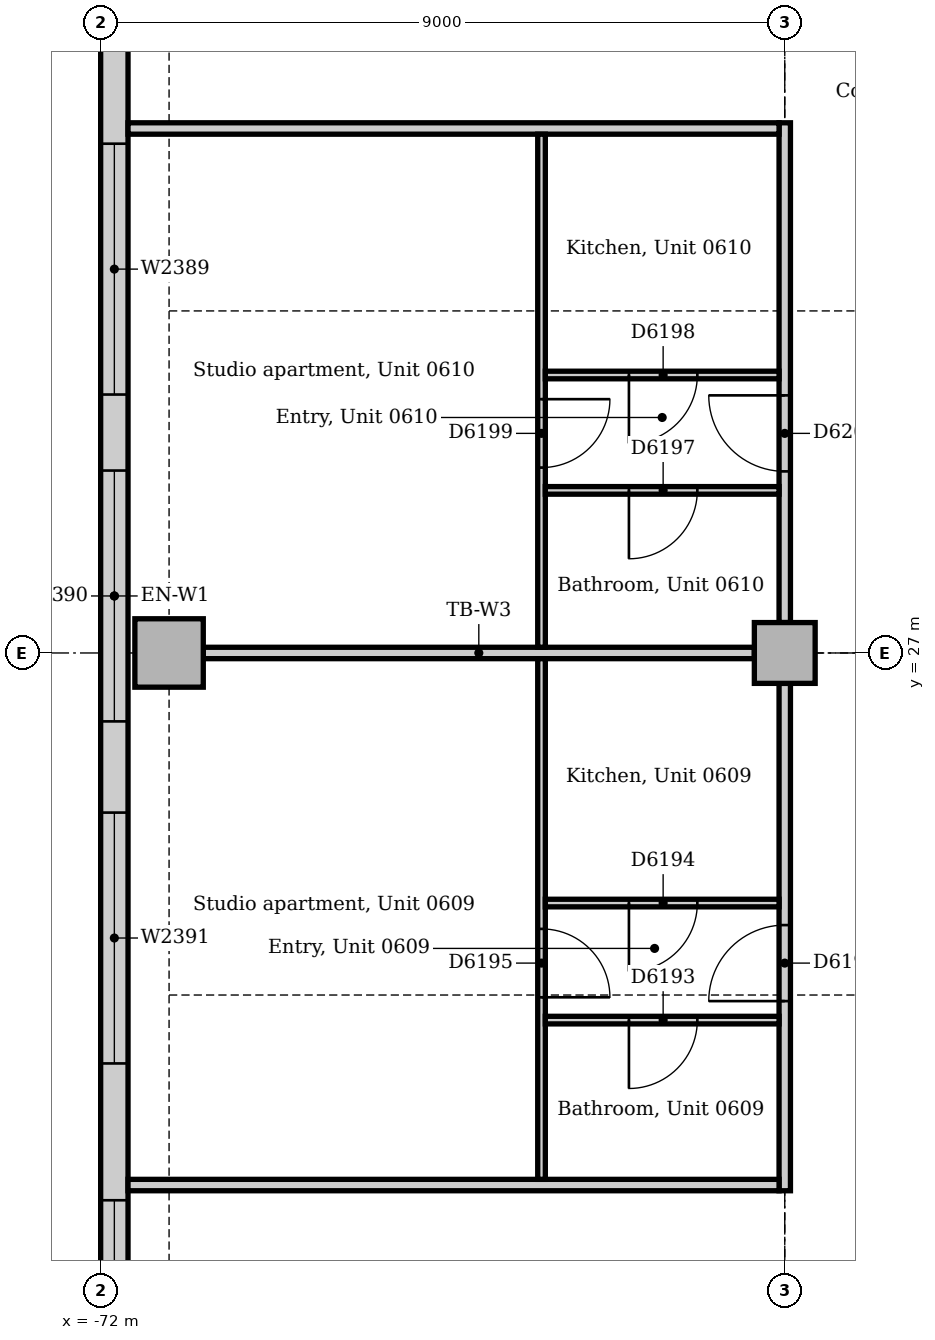
"""IFC4 building model, lengths in metres.
Left out: names, types, materials, properties, quantities, classifications, styles, units other than length and angle.
Written with IfcOpenShell. Run it as: python <this file> out.ifc"""

import sys

from ifc_helpers import new_model, si_unit, direction, frame, frame_2d, origin, origin_2d, place, context, subcontext, project, spatial, rectangle, extrude, element, fill, save


model = new_model("IFC4")
c1 = context("Model", 3, precision=1e-05, world=origin(), true_north=direction((0.0, 1.0)))
c2 = subcontext(c1, "Body", "Model", "MODEL_VIEW")
j1 = project(units=[si_unit("LENGTHUNIT", "METRE"), si_unit("PLANEANGLEUNIT", "RADIAN")], contexts=[c1])
p1 = place(None, origin())
s1 = spatial("IfcSite", under=j1, at=p1, CompositionType="ELEMENT")
p2 = place(p1, origin())
s2 = spatial("IfcBuilding", under=s1, at=p2, CompositionType="ELEMENT")
p3 = place(p2, frame((0.0, 0.0, 30.0)))
s3 = spatial("IfcBuildingStorey", under=s2, at=p3, CompositionType="ELEMENT", Elevation=30.0)
p4 = place(p3, frame((-71.1, 27.0, 0.0), z_axis=(0.0, 0.0, 1.0), x_axis=(1.0, 0.0, 0.0)))
e1 = element("IfcColumn", 1, at=p4, inside=s3, PredefinedType="COLUMN", context=c2, shape_type="SweptSolid", body=[
    extrude(rectangle(XDim=0.9, YDim=0.9, at=origin_2d()), origin(), (0.0, 0.0, 1.0), 3.85),
])
p5 = place(p3, frame((-63.0, 27.0, 0.0), z_axis=(0.0, 0.0, 1.0), x_axis=(1.0, 0.0, 0.0)))
e2 = element("IfcColumn", 2, at=p5, inside=s3, PredefinedType="COLUMN", context=c2, shape_type="SweptSolid", body=[
    extrude(rectangle(XDim=0.8, YDim=0.8, at=origin_2d()), origin(), (0.0, 0.0, 1.0), 3.85),
])
p6 = place(p3, frame((-71.82, 40.757, 0.0), z_axis=(0.0, 0.0, 1.0), x_axis=(0.0, -1.0, 0.0)))
e3 = element("IfcWall", 3, at=p6, inside=s3, PredefinedType="STANDARD", context=c2, shape_type="SweptSolid", body=[
    extrude(rectangle(XDim=26.015, YDim=0.36, at=frame_2d((13.007, 0.0))), origin(), (0.0, 0.0, 1.0), 3.85),
])
p7 = place(p6, frame((2.357, 0.0, 0.9)))
e4 = element("IfcOpeningElement", 4, at=p7, cuts=e3, PredefinedType="OPENING", context=c2, shape_type="SweptSolid", body=[
    extrude(rectangle(XDim=3.3, YDim=1.6, at=frame_2d((1.65, 0.8))), frame((0.0, 0.19, 0.0), z_axis=(0.0, -1.0, 0.0), x_axis=(1.0, 0.0, 0.0)), (0.0, 0.0, 1.0), 0.38),
])
p8 = place(p6, frame((7.057, 0.0, 0.9)))
e5 = element("IfcOpeningElement", 5, at=p8, cuts=e3, PredefinedType="OPENING", context=c2, shape_type="SweptSolid", body=[
    extrude(rectangle(XDim=3.3, YDim=1.6, at=frame_2d((1.65, 0.8))), frame((0.0, 0.19, 0.0), z_axis=(0.0, -1.0, 0.0), x_axis=(1.0, 0.0, 0.0)), (0.0, 0.0, 1.0), 0.38),
])
p9 = place(p6, frame((11.357, 0.0, 0.9)))
e6 = element("IfcOpeningElement", 6, at=p9, cuts=e3, PredefinedType="OPENING", context=c2, shape_type="SweptSolid", body=[
    extrude(rectangle(XDim=3.3, YDim=1.6, at=frame_2d((1.65, 0.8))), frame((0.0, 0.19, 0.0), z_axis=(0.0, -1.0, 0.0), x_axis=(1.0, 0.0, 0.0)), (0.0, 0.0, 1.0), 0.38),
])
p10 = place(p6, frame((15.857, 0.0, 0.9)))
e7 = element("IfcOpeningElement", 7, at=p10, cuts=e3, PredefinedType="OPENING", context=c2, shape_type="SweptSolid", body=[
    extrude(rectangle(XDim=3.3, YDim=1.6, at=frame_2d((1.65, 0.8))), frame((0.0, 0.19, 0.0), z_axis=(0.0, -1.0, 0.0), x_axis=(1.0, 0.0, 0.0)), (0.0, 0.0, 1.0), 0.38),
])
p11 = place(p6, frame((20.957, 0.0, 0.9)))
e8 = element("IfcOpeningElement", 8, at=p11, cuts=e3, PredefinedType="OPENING", context=c2, shape_type="SweptSolid", body=[
    extrude(rectangle(XDim=3.3, YDim=1.6, at=frame_2d((1.65, 0.8))), frame((0.0, 0.19, 0.0), z_axis=(0.0, -1.0, 0.0), x_axis=(1.0, 0.0, 0.0)), (0.0, 0.0, 1.0), 0.38),
])
p12 = place(p3, frame((-63.0, 19.925, 0.0), z_axis=(0.0, 0.0, 1.0), x_axis=(0.0, 1.0, 0.0)))
e9 = element("IfcWall", 9, at=p12, inside=s3, PredefinedType="PARTITIONING", context=c2, shape_type="SweptSolid", body=[
    extrude(rectangle(XDim=6.675, YDim=0.15, at=frame_2d((3.337, 0.0))), origin(), (0.0, 0.0, 1.0), 3.158),
])
p13 = place(p12, frame((2.495, 0.0, 0.0)))
e10 = element("IfcOpeningElement", 10, at=p13, cuts=e9, PredefinedType="OPENING", context=c2, shape_type="SweptSolid", body=[
    extrude(rectangle(XDim=1.0, YDim=2.1, at=frame_2d((0.5, 1.05))), frame((0.0, 0.085, 0.0), z_axis=(0.0, -1.0, 0.0), x_axis=(1.0, 0.0, 0.0)), (0.0, 0.0, 1.0), 0.17),
])
p14 = place(p3, frame((-63.0, 27.4, 0.0), z_axis=(0.0, 0.0, 1.0), x_axis=(0.0, 1.0, 0.0)))
e11 = element("IfcWall", 11, at=p14, inside=s3, PredefinedType="PARTITIONING", context=c2, shape_type="SweptSolid", body=[
    extrude(rectangle(XDim=6.575, YDim=0.15, at=frame_2d((3.288, 0.0))), origin(), (0.0, 0.0, 1.0), 3.158),
])
p15 = place(p14, frame((1.989, 0.0, 0.0)))
e12 = element("IfcOpeningElement", 12, at=p15, cuts=e11, PredefinedType="OPENING", context=c2, shape_type="SweptSolid", body=[
    extrude(rectangle(XDim=1.0, YDim=2.1, at=frame_2d((0.5, 1.05))), frame((0.0, 0.085, 0.0), z_axis=(0.0, -1.0, 0.0), x_axis=(1.0, 0.0, 0.0)), (0.0, 0.0, 1.0), 0.17),
])
for number, where, z_axis, x_axis in (
    (13, (-71.64, 20.0, 0.0), (0.0, 0.0, 1.0), (1.0, 0.0, 0.0)),
    (14, (-71.64, 33.9, 0.0), (0.0, 0.0, 1.0), (1.0, 0.0, 0.0)),
):
    element("IfcWall", number, at=place(p3, frame(where, z_axis=z_axis, x_axis=x_axis)), inside=s3, PredefinedType="PARTITIONING", context=c2, shape_type="SweptSolid", body=[
        extrude(rectangle(XDim=8.565, YDim=0.15, at=frame_2d((4.282, 0.0))), origin(), (0.0, 0.0, 1.0), 3.85),
    ])
p16 = place(p3, frame((-70.65, 27.0, 0.0), z_axis=(0.0, 0.0, 1.0), x_axis=(1.0, 0.0, 0.0)))
e15 = element("IfcWall", 15, at=p16, inside=s3, PredefinedType="PARTITIONING", context=c2, shape_type="SweptSolid", body=[
    extrude(rectangle(XDim=7.25, YDim=0.15, at=frame_2d((3.625, 0.0))), origin(), (0.0, 0.0, 1.0), 3.15),
])
p17 = place(p3, frame((-66.2, 27.075, 0.0), z_axis=(0.0, 0.0, 1.0), x_axis=(0.0, 1.0, 0.0)))
e16 = element("IfcWall", 16, at=p17, inside=s3, PredefinedType="PARTITIONING", context=c2, shape_type="SweptSolid", body=[
    extrude(rectangle(XDim=6.75, YDim=0.1, at=frame_2d((3.375, 0.0))), origin(), (0.0, 0.0, 1.0), 3.85),
])
p18 = place(p17, frame((2.364, 0.0, 0.0)))
e17 = element("IfcOpeningElement", 17, at=p18, cuts=e16, PredefinedType="OPENING", context=c2, shape_type="SweptSolid", body=[
    extrude(rectangle(XDim=0.9, YDim=2.1, at=frame_2d((0.45, 1.05))), frame((0.0, 0.06, 0.0), z_axis=(0.0, -1.0, 0.0), x_axis=(1.0, 0.0, 0.0)), (0.0, 0.0, 1.0), 0.12),
])
p19 = place(p3, frame((-66.2, 20.075, 0.0), z_axis=(0.0, 0.0, 1.0), x_axis=(0.0, 1.0, 0.0)))
e18 = element("IfcWall", 18, at=p19, inside=s3, PredefinedType="PARTITIONING", context=c2, shape_type="SweptSolid", body=[
    extrude(rectangle(XDim=6.85, YDim=0.1, at=frame_2d((3.425, 0.0))), origin(), (0.0, 0.0, 1.0), 3.85),
])
p20 = place(p19, frame((2.395, 0.0, 0.0)))
e19 = element("IfcOpeningElement", 19, at=p20, cuts=e18, PredefinedType="OPENING", context=c2, shape_type="SweptSolid", body=[
    extrude(rectangle(XDim=0.9, YDim=2.1, at=frame_2d((0.45, 1.05))), frame((0.0, 0.06, 0.0), z_axis=(0.0, -1.0, 0.0), x_axis=(1.0, 0.0, 0.0)), (0.0, 0.0, 1.0), 0.12),
])
p21 = place(p3, frame((-66.15, 22.17, 0.0), z_axis=(0.0, 0.0, 1.0), x_axis=(1.0, 0.0, 0.0)))
e20 = element("IfcWall", 20, at=p21, inside=s3, PredefinedType="PARTITIONING", context=c2, shape_type="SweptSolid", body=[
    extrude(rectangle(XDim=3.075, YDim=0.1, at=frame_2d((1.538, 0.0))), origin(), (0.0, 0.0, 1.0), 3.85),
])
p22 = place(p21, frame((1.1, 0.0, 0.0)))
e21 = element("IfcOpeningElement", 21, at=p22, cuts=e20, PredefinedType="OPENING", context=c2, shape_type="SweptSolid", body=[
    extrude(rectangle(XDim=0.9, YDim=2.1, at=frame_2d((0.45, 1.05))), frame((0.0, 0.06, 0.0), z_axis=(0.0, -1.0, 0.0), x_axis=(1.0, 0.0, 0.0)), (0.0, 0.0, 1.0), 0.12),
])
p23 = place(p3, frame((-66.15, 23.71, 0.0), z_axis=(0.0, 0.0, 1.0), x_axis=(1.0, 0.0, 0.0)))
e22 = element("IfcWall", 22, at=p23, inside=s3, PredefinedType="PARTITIONING", context=c2, shape_type="SweptSolid", body=[
    extrude(rectangle(XDim=3.075, YDim=0.1, at=frame_2d((1.538, 0.0))), origin(), (0.0, 0.0, 1.0), 3.85),
])
p24 = place(p23, frame((1.1, 0.0, 0.0)))
e23 = element("IfcOpeningElement", 23, at=p24, cuts=e22, PredefinedType="OPENING", context=c2, shape_type="SweptSolid", body=[
    extrude(rectangle(XDim=0.9, YDim=2.1, at=frame_2d((0.45, 1.05))), frame((0.0, 0.06, 0.0), z_axis=(0.0, -1.0, 0.0), x_axis=(1.0, 0.0, 0.0)), (0.0, 0.0, 1.0), 0.12),
])
p25 = place(p3, frame((-66.15, 29.139, 0.0), z_axis=(0.0, 0.0, 1.0), x_axis=(1.0, 0.0, 0.0)))
e24 = element("IfcWall", 24, at=p25, inside=s3, PredefinedType="PARTITIONING", context=c2, shape_type="SweptSolid", body=[
    extrude(rectangle(XDim=3.075, YDim=0.1, at=frame_2d((1.538, 0.0))), origin(), (0.0, 0.0, 1.0), 3.85),
])
p26 = place(p25, frame((1.1, 0.0, 0.0)))
e25 = element("IfcOpeningElement", 25, at=p26, cuts=e24, PredefinedType="OPENING", context=c2, shape_type="SweptSolid", body=[
    extrude(rectangle(XDim=0.9, YDim=2.1, at=frame_2d((0.45, 1.05))), frame((0.0, 0.06, 0.0), z_axis=(0.0, -1.0, 0.0), x_axis=(1.0, 0.0, 0.0)), (0.0, 0.0, 1.0), 0.12),
])
p27 = place(p3, frame((-66.15, 30.657, 0.0), z_axis=(0.0, 0.0, 1.0), x_axis=(1.0, 0.0, 0.0)))
e26 = element("IfcWall", 26, at=p27, inside=s3, PredefinedType="PARTITIONING", context=c2, shape_type="SweptSolid", body=[
    extrude(rectangle(XDim=3.075, YDim=0.1, at=frame_2d((1.538, 0.0))), origin(), (0.0, 0.0, 1.0), 3.85),
])
p28 = place(p27, frame((1.1, 0.0, 0.0)))
e27 = element("IfcOpeningElement", 27, at=p28, cuts=e26, PredefinedType="OPENING", context=c2, shape_type="SweptSolid", body=[
    extrude(rectangle(XDim=0.9, YDim=2.1, at=frame_2d((0.45, 1.05))), frame((0.0, 0.06, 0.0), z_axis=(0.0, -1.0, 0.0), x_axis=(1.0, 0.0, 0.0)), (0.0, 0.0, 1.0), 0.12),
])
p29 = place(p8, origin())
e28 = element("IfcWindow", 28, at=p29, inside=s3, PartitioningType="SINGLE_PANEL", PredefinedType="WINDOW", context=c2, shape_type="SweptSolid", body=[
    extrude(rectangle(XDim=3.3, YDim=1.6, at=frame_2d((1.65, 0.8))), frame((0.0, 0.13, 0.0), z_axis=(0.0, -1.0, 0.0), x_axis=(1.0, 0.0, 0.0)), (0.0, 0.0, 1.0), 0.06),
])
fill(e5, e28)
p30 = place(p9, origin())
e29 = element("IfcWindow", 29, at=p30, inside=s3, PartitioningType="SINGLE_PANEL", PredefinedType="WINDOW", context=c2, shape_type="SweptSolid", body=[
    extrude(rectangle(XDim=3.3, YDim=1.6, at=frame_2d((1.65, 0.8))), frame((0.0, 0.13, 0.0), z_axis=(0.0, -1.0, 0.0), x_axis=(1.0, 0.0, 0.0)), (0.0, 0.0, 1.0), 0.06),
])
fill(e6, e29)
p31 = place(p10, origin())
e30 = element("IfcWindow", 30, at=p31, inside=s3, PartitioningType="SINGLE_PANEL", PredefinedType="WINDOW", context=c2, shape_type="SweptSolid", body=[
    extrude(rectangle(XDim=3.3, YDim=1.6, at=frame_2d((1.65, 0.8))), frame((0.0, 0.13, 0.0), z_axis=(0.0, -1.0, 0.0), x_axis=(1.0, 0.0, 0.0)), (0.0, 0.0, 1.0), 0.06),
])
fill(e7, e30)
p32 = place(p11, origin())
e31 = element("IfcWindow", 31, at=p32, inside=s3, PartitioningType="SINGLE_PANEL", PredefinedType="WINDOW", context=c2, shape_type="SweptSolid", body=[
    extrude(rectangle(XDim=3.3, YDim=1.6, at=frame_2d((1.65, 0.8))), frame((0.0, 0.13, 0.0), z_axis=(0.0, -1.0, 0.0), x_axis=(1.0, 0.0, 0.0)), (0.0, 0.0, 1.0), 0.06),
])
fill(e8, e31)
p33 = place(p22, frame((0.9, 0.0, 0.0), z_axis=(0.0, 0.0, 1.0), x_axis=(-1.0, 0.0, 0.0)))
e32 = element("IfcDoor", 32, at=p33, inside=s3, OperationType="SINGLE_SWING_RIGHT", PredefinedType="DOOR", context=c2, shape_type="SweptSolid", body=[
    extrude(rectangle(XDim=0.9, YDim=2.1, at=frame_2d((0.45, 1.05))), frame((0.0, 0.025, 0.0), z_axis=(0.0, -1.0, 0.0), x_axis=(1.0, 0.0, 0.0)), (0.0, 0.0, 1.0), 0.05),
])
fill(e21, e32)
p34 = place(p24, frame((0.9, 0.0, 0.0), z_axis=(0.0, 0.0, 1.0), x_axis=(-1.0, 0.0, 0.0)))
e33 = element("IfcDoor", 33, at=p34, inside=s3, OperationType="SINGLE_SWING_RIGHT", PredefinedType="DOOR", context=c2, shape_type="SweptSolid", body=[
    extrude(rectangle(XDim=0.9, YDim=2.1, at=frame_2d((0.45, 1.05))), frame((0.0, 0.025, 0.0), z_axis=(0.0, -1.0, 0.0), x_axis=(1.0, 0.0, 0.0)), (0.0, 0.0, 1.0), 0.05),
])
fill(e23, e33)
p35 = place(p20, frame((0.9, 0.0, 0.0), z_axis=(0.0, 0.0, 1.0), x_axis=(-1.0, 0.0, 0.0)))
e34 = element("IfcDoor", 34, at=p35, inside=s3, OperationType="SINGLE_SWING_RIGHT", PredefinedType="DOOR", context=c2, shape_type="SweptSolid", body=[
    extrude(rectangle(XDim=0.9, YDim=2.1, at=frame_2d((0.45, 1.05))), frame((0.0, 0.025, 0.0), z_axis=(0.0, -1.0, 0.0), x_axis=(1.0, 0.0, 0.0)), (0.0, 0.0, 1.0), 0.05),
])
fill(e19, e34)
p36 = place(p13, origin())
e35 = element("IfcDoor", 35, at=p36, inside=s3, OperationType="SINGLE_SWING_LEFT", PredefinedType="DOOR", context=c2, shape_type="SweptSolid", body=[
    extrude(rectangle(XDim=1.0, YDim=2.1, at=frame_2d((0.5, 1.05))), frame((0.0, 0.025, 0.0), z_axis=(0.0, -1.0, 0.0), x_axis=(1.0, 0.0, 0.0)), (0.0, 0.0, 1.0), 0.05),
])
fill(e10, e35)
p37 = place(p26, frame((0.9, 0.0, 0.0), z_axis=(0.0, 0.0, 1.0), x_axis=(-1.0, 0.0, 0.0)))
e36 = element("IfcDoor", 36, at=p37, inside=s3, OperationType="SINGLE_SWING_RIGHT", PredefinedType="DOOR", context=c2, shape_type="SweptSolid", body=[
    extrude(rectangle(XDim=0.9, YDim=2.1, at=frame_2d((0.45, 1.05))), frame((0.0, 0.025, 0.0), z_axis=(0.0, -1.0, 0.0), x_axis=(1.0, 0.0, 0.0)), (0.0, 0.0, 1.0), 0.05),
])
fill(e25, e36)
p38 = place(p28, frame((0.9, 0.0, 0.0), z_axis=(0.0, 0.0, 1.0), x_axis=(-1.0, 0.0, 0.0)))
e37 = element("IfcDoor", 37, at=p38, inside=s3, OperationType="SINGLE_SWING_RIGHT", PredefinedType="DOOR", context=c2, shape_type="SweptSolid", body=[
    extrude(rectangle(XDim=0.9, YDim=2.1, at=frame_2d((0.45, 1.05))), frame((0.0, 0.025, 0.0), z_axis=(0.0, -1.0, 0.0), x_axis=(1.0, 0.0, 0.0)), (0.0, 0.0, 1.0), 0.05),
])
fill(e27, e37)
p39 = place(p18, frame((0.9, 0.0, 0.0), z_axis=(0.0, 0.0, 1.0), x_axis=(-1.0, 0.0, 0.0)))
e38 = element("IfcDoor", 38, at=p39, inside=s3, OperationType="SINGLE_SWING_LEFT", PredefinedType="DOOR", context=c2, shape_type="SweptSolid", body=[
    extrude(rectangle(XDim=0.9, YDim=2.1, at=frame_2d((0.45, 1.05))), frame((0.0, 0.025, 0.0), z_axis=(0.0, -1.0, 0.0), x_axis=(1.0, 0.0, 0.0)), (0.0, 0.0, 1.0), 0.05),
])
fill(e17, e38)
p40 = place(p15, origin())
e39 = element("IfcDoor", 39, at=p40, inside=s3, OperationType="SINGLE_SWING_RIGHT", PredefinedType="DOOR", context=c2, shape_type="SweptSolid", body=[
    extrude(rectangle(XDim=1.0, YDim=2.1, at=frame_2d((0.5, 1.05))), frame((0.0, 0.025, 0.0), z_axis=(0.0, -1.0, 0.0), x_axis=(1.0, 0.0, 0.0)), (0.0, 0.0, 1.0), 0.05),
])
fill(e12, e39)
save(model, sys.argv[1])
